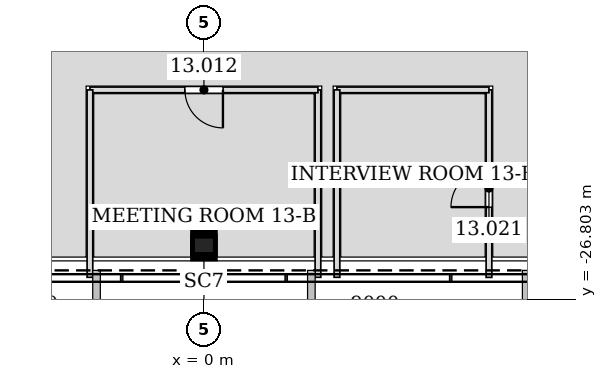
"""IFC4 building model, lengths in metres.
Left out: names, types, materials, properties, quantities, classifications, styles, units other than length and angle.
Written with IfcOpenShell. Run it as: python <this file> out.ifc"""

import sys

from ifc_helpers import new_model, si_unit, direction, frame, frame_2d, origin, origin_2d, place, context, subcontext, project, spatial, rectangle, hollow_rectangle, extrude, element, fill, save


model = new_model("IFC4")
c1 = context("Model", 3, precision=1e-05, world=origin(), true_north=direction((0.0, 1.0)))
c2 = subcontext(c1, "Body", "Model", "MODEL_VIEW")
j1 = project(units=[si_unit("LENGTHUNIT", "METRE"), si_unit("PLANEANGLEUNIT", "RADIAN")], contexts=[c1])
p1 = place(None, origin())
s1 = spatial("IfcSite", under=j1, at=p1, CompositionType="ELEMENT")
p2 = place(p1, origin())
s2 = spatial("IfcBuilding", under=s1, at=p2, CompositionType="ELEMENT")
p3 = place(p2, frame((0.0, 0.0, 62.4)))
s3 = spatial("IfcBuildingStorey", under=s2, at=p3, CompositionType="ELEMENT", Elevation=62.4)
p4 = place(p3, frame((0.0, -25.449, 0.0), z_axis=(0.0, 0.028237979375, 0.999601228751), x_axis=(-1.0, 0.0, 0.0)))
e1 = element("IfcColumn", 1, at=p4, inside=s3, PredefinedType="COLUMN", context=c2, shape_type="SweptSolid", body=[
    extrude(hollow_rectangle(XDim=0.6, YDim=0.6, WallThickness=0.032, at=origin_2d()), origin(), (0.0, 0.0, 1.0), 4.202),
])
p5 = place(p3, frame((3.0, -26.231, 0.0), z_axis=(0.0, 0.0, 1.0), x_axis=(0.0, 1.0, 0.0)))
e2 = element("IfcWall", 2, at=p5, inside=s3, PredefinedType="PARTITIONING", context=c2, shape_type="SweptSolid", body=[
    extrude(rectangle(XDim=4.932, YDim=0.15, at=frame_2d((2.466, 0.0))), origin(), (0.0, 0.0, 1.0), 3.423),
])
p6 = place(p3, frame((3.0, -21.3, 0.0), z_axis=(0.0, 0.0, 1.0), x_axis=(-1.0, 0.0, 0.0)))
e3 = element("IfcWall", 3, at=p6, inside=s3, PredefinedType="PARTITIONING", context=c2, shape_type="SweptSolid", body=[
    extrude(rectangle(XDim=6.0, YDim=0.15, at=frame_2d((3.0, 0.0))), origin(), (0.0, 0.0, 1.0), 2.984),
])
p7 = place(p6, frame((2.5, 0.0, 0.0)))
e4 = element("IfcOpeningElement", 4, at=p7, cuts=e3, PredefinedType="OPENING", context=c2, shape_type="SweptSolid", body=[
    extrude(rectangle(XDim=1.0, YDim=2.1, at=frame_2d((0.5, 1.05))), frame((0.0, 0.085, 0.0), z_axis=(0.0, -1.0, 0.0), x_axis=(1.0, 0.0, 0.0)), (0.0, 0.0, 1.0), 0.17),
])
p8 = place(p3, frame((-3.0, -21.3, 0.0), z_axis=(0.0, 0.0, 1.0), x_axis=(0.0, -1.0, 0.0)))
e5 = element("IfcWall", 5, at=p8, inside=s3, PredefinedType="PARTITIONING", context=c2, shape_type="SweptSolid", body=[
    extrude(rectangle(XDim=4.932, YDim=0.15, at=frame_2d((2.466, 0.0))), origin(), (0.0, 0.0, 1.0), 3.423),
])
p9 = place(p3, frame((7.5, -26.233, 0.0), z_axis=(0.0, 0.0, 1.0), x_axis=(0.0, 1.0, 0.0)))
e6 = element("IfcWall", 6, at=p9, inside=s3, PredefinedType="PARTITIONING", context=c2, shape_type="SweptSolid", body=[
    extrude(rectangle(XDim=4.934, YDim=0.15, at=frame_2d((2.467, 0.0))), origin(), (0.0, 0.0, 1.0), 3.423),
])
p10 = place(p9, frame((1.849, 0.0, 0.0)))
e7 = element("IfcOpeningElement", 7, at=p10, cuts=e6, PredefinedType="OPENING", context=c2, shape_type="SweptSolid", body=[
    extrude(rectangle(XDim=1.0, YDim=2.1, at=frame_2d((0.5, 1.05))), frame((0.0, 0.085, 0.0), z_axis=(0.0, -1.0, 0.0), x_axis=(1.0, 0.0, 0.0)), (0.0, 0.0, 1.0), 0.17),
])
p11 = place(p3, frame((7.5, -21.3, 0.0), z_axis=(0.0, 0.0, 1.0), x_axis=(-1.0, 0.0, 0.0)))
e8 = element("IfcWall", 8, at=p11, inside=s3, PredefinedType="PARTITIONING", context=c2, shape_type="SweptSolid", body=[
    extrude(rectangle(XDim=4.0, YDim=0.15, at=frame_2d((2.0, 0.0))), origin(), (0.0, 0.0, 1.0), 4.035),
])
p12 = place(p3, frame((3.5, -21.3, 0.0), z_axis=(0.0, 0.0, 1.0), x_axis=(0.0, -1.0, 0.0)))
e9 = element("IfcWall", 9, at=p12, inside=s3, PredefinedType="PARTITIONING", context=c2, shape_type="SweptSolid", body=[
    extrude(rectangle(XDim=4.932, YDim=0.15, at=frame_2d((2.466, 0.0))), origin(), (0.0, 0.0, 1.0), 3.423),
])
p13 = place(p7, origin())
e10 = element("IfcDoor", 10, at=p13, inside=s3, OperationType="SINGLE_SWING_LEFT", PredefinedType="DOOR", context=c2, shape_type="SweptSolid", body=[
    extrude(rectangle(XDim=1.0, YDim=2.1, at=frame_2d((0.5, 1.05))), frame((0.0, 0.025, 0.0), z_axis=(0.0, -1.0, 0.0), x_axis=(1.0, 0.0, 0.0)), (0.0, 0.0, 1.0), 0.05),
])
fill(e4, e10)
p14 = place(p10, origin())
e11 = element("IfcDoor", 11, at=p14, inside=s3, OperationType="SINGLE_SWING_LEFT", PredefinedType="DOOR", context=c2, shape_type="SweptSolid", body=[
    extrude(rectangle(XDim=1.0, YDim=2.1, at=frame_2d((0.5, 1.05))), frame((0.0, 0.025, 0.0), z_axis=(0.0, -1.0, 0.0), x_axis=(1.0, 0.0, 0.0)), (0.0, 0.0, 1.0), 0.05),
])
fill(e7, e11)
save(model, sys.argv[1])
